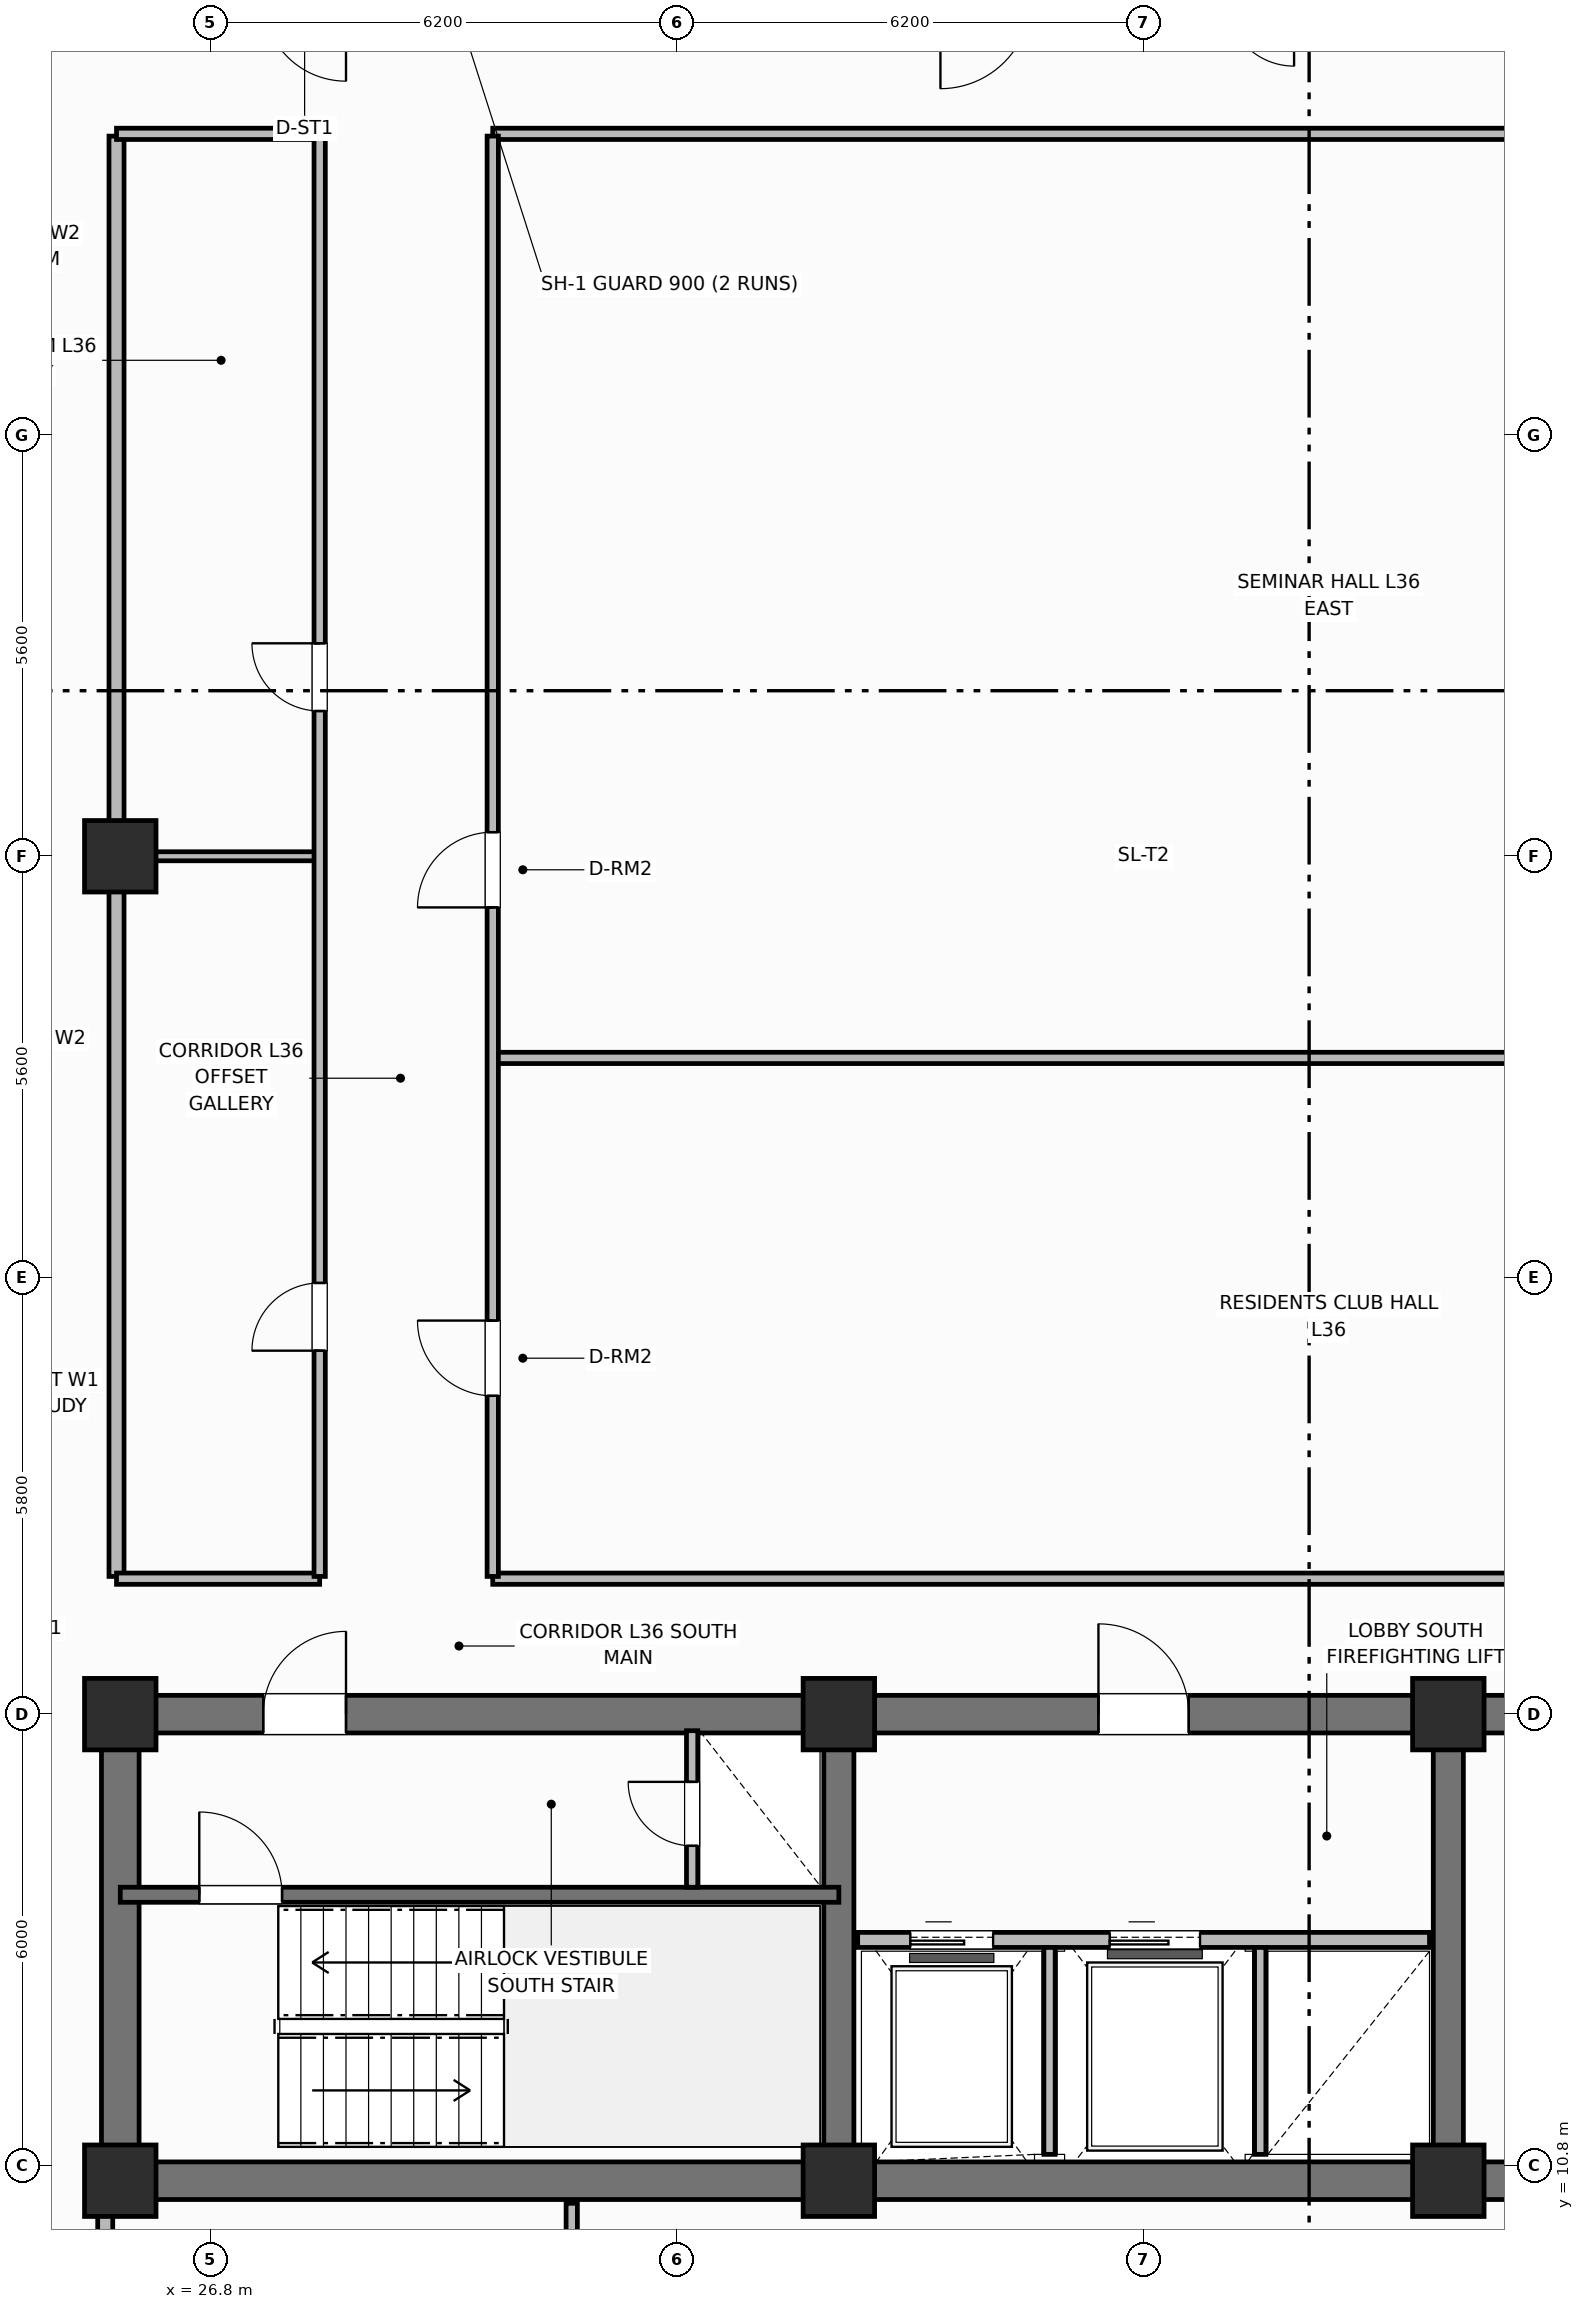
"""IFC4 building model, lengths in metres.
Left out: names, types, materials, properties, quantities, classifications, styles, units other than length and angle.
Written with IfcOpenShell. Run it as: python <this file> out.ifc"""

import sys

from ifc_helpers import new_model, si_unit, direction, frame, frame_2d, origin, origin_2d, place, context, subcontext, project, spatial, rectangle, extrude, element, fill, save


model = new_model("IFC4")
c1 = context("Model", 3, precision=1e-05, world=origin(), true_north=direction((0.0, 1.0)))
c2 = subcontext(c1, "Body", "Model", "MODEL_VIEW")
j1 = project(units=[si_unit("LENGTHUNIT", "METRE"), si_unit("PLANEANGLEUNIT", "RADIAN")], contexts=[c1])
p1 = place(None, origin())
s1 = spatial("IfcSite", under=j1, at=p1, CompositionType="ELEMENT")
p2 = place(p1, origin())
s2 = spatial("IfcBuilding", under=s1, at=p2, CompositionType="ELEMENT")
p3 = place(p2, frame((0.0, 0.0, 147.8)))
s3 = spatial("IfcBuildingStorey", under=s2, at=p3, CompositionType="ELEMENT", Elevation=147.8)
p4 = place(p3, frame((52.8, 10.6, 0.0), z_axis=(0.0, 0.0, 1.0), x_axis=(-1.0, 0.0, 0.0)))
e1 = element("IfcWall", 1, at=p4, inside=s3, PredefinedType="SHEAR", context=c2, shape_type="SweptSolid", body=[
    extrude(rectangle(XDim=27.2, YDim=0.5, at=frame_2d((13.6, 0.0))), origin(), (0.0, 0.0, 1.0), 3.7),
])
p5 = place(p3, frame((25.6, 10.85, 0.0), z_axis=(0.0, 0.0, 1.0), x_axis=(0.0, 1.0, 0.0)))
e2 = element("IfcWall", 2, at=p5, inside=s3, PredefinedType="SHEAR", context=c2, shape_type="SweptSolid", body=[
    extrude(rectangle(XDim=5.7, YDim=0.5, at=frame_2d((2.85, 0.0))), origin(), (0.0, 0.0, 1.0), 3.7),
])
p6 = place(p3, frame((25.6, 16.8, 0.0), z_axis=(0.0, 0.0, 1.0), x_axis=(1.0, 0.0, 0.0)))
e3 = element("IfcWall", 3, at=p6, inside=s3, PredefinedType="SHEAR", context=c2, shape_type="SweptSolid", body=[
    extrude(rectangle(XDim=27.2, YDim=0.5, at=frame_2d((13.6, 0.0))), origin(), (0.0, 0.0, 1.0), 3.7),
])
p7 = place(p6, frame((1.9, 0.0, 0.0)))
e4 = element("IfcOpeningElement", 4, at=p7, cuts=e3, PredefinedType="OPENING", context=c2, shape_type="SweptSolid", body=[
    extrude(rectangle(XDim=1.1, YDim=2.15, at=frame_2d((0.55, 1.075))), frame((0.0, 0.26, 0.0), z_axis=(0.0, -1.0, 0.0), x_axis=(1.0, 0.0, 0.0)), (0.0, 0.0, 1.0), 0.52),
])
p8 = place(p6, frame((13.0, 0.0, 0.0)))
e5 = element("IfcOpeningElement", 5, at=p8, cuts=e3, PredefinedType="OPENING", context=c2, shape_type="SweptSolid", body=[
    extrude(rectangle(XDim=1.2, YDim=2.15, at=frame_2d((0.6, 1.075))), frame((0.0, 0.26, 0.0), z_axis=(0.0, -1.0, 0.0), x_axis=(1.0, 0.0, 0.0)), (0.0, 0.0, 1.0), 0.52),
])
p9 = place(p6, frame((21.6, 0.0, 0.0)))
e6 = element("IfcOpeningElement", 6, at=p9, cuts=e3, PredefinedType="OPENING", context=c2, shape_type="SweptSolid", body=[
    extrude(rectangle(XDim=1.0, YDim=2.15, at=frame_2d((0.5, 1.075))), frame((0.0, 0.26, 0.0), z_axis=(0.0, -1.0, 0.0), x_axis=(1.0, 0.0, 0.0)), (0.0, 0.0, 1.0), 0.52),
])
for number, where, z_axis, x_axis in (
    (7, (35.15, 10.85, 0.0), (0.0, 0.0, 1.0), (0.0, 1.0, 0.0)),
    (8, (43.25, 10.85, 0.0), (0.0, 0.0, 1.0), (0.0, 1.0, 0.0)),
):
    element("IfcWall", number, at=place(p3, frame(where, z_axis=z_axis, x_axis=x_axis)), inside=s3, PredefinedType="SHEAR", context=c2, shape_type="SweptSolid", body=[
        extrude(rectangle(XDim=5.7, YDim=0.4, at=frame_2d((2.85, 0.0))), origin(), (0.0, 0.0, 1.0), 3.7),
    ])
for number, where, z_axis, x_axis in (
    (9, (25.6, 10.6, 0.0), (0.0, 0.0, 1.0), (1.0, 0.0, 0.0)),
    (10, (25.6, 16.8, 0.0), (0.0, 0.0, 1.0), (1.0, 0.0, 0.0)),
    (11, (35.15, 10.6, 0.0), (0.0, 0.0, 1.0), (1.0, 0.0, 0.0)),
    (12, (35.15, 16.8, 0.0), (0.0, 0.0, 1.0), (1.0, 0.0, 0.0)),
    (13, (43.25, 10.6, 0.0), (0.0, 0.0, 1.0), (1.0, 0.0, 0.0)),
    (14, (43.25, 16.8, 0.0), (0.0, 0.0, 1.0), (1.0, 0.0, 0.0)),
    (15, (25.6, 28.2, 0.0), (0.0, 0.0, 1.0), (1.0, 0.0, 0.0)),
):
    element("IfcColumn", number, at=place(p3, frame(where, z_axis=z_axis, x_axis=x_axis)), inside=s3, PredefinedType="COLUMN", context=c2, shape_type="SweptSolid", body=[
        extrude(rectangle(XDim=0.95, YDim=0.95, at=origin_2d()), origin(), (0.0, 0.0, 1.0), 3.7),
    ])
p10 = place(p3, frame((25.6, 14.4, 0.0), z_axis=(0.0, 0.0, 1.0), x_axis=(1.0, 0.0, 0.0)))
e16 = element("IfcWall", 16, at=p10, inside=s3, PredefinedType="SHEAR", context=c2, shape_type="SweptSolid", body=[
    extrude(rectangle(XDim=9.55, YDim=0.2, at=frame_2d((4.775, 0.0))), origin(), (0.0, 0.0, 1.0), 3.7),
])
p11 = place(p10, frame((1.05, 0.0, 0.0)))
e17 = element("IfcOpeningElement", 17, at=p11, cuts=e16, PredefinedType="OPENING", context=c2, shape_type="SweptSolid", body=[
    extrude(rectangle(XDim=1.1, YDim=2.15, at=frame_2d((0.55, 1.075))), frame((0.0, 0.11, 0.0), z_axis=(0.0, -1.0, 0.0), x_axis=(1.0, 0.0, 0.0)), (0.0, 0.0, 1.0), 0.22),
])
p12 = place(p3, frame((33.2, 14.5, 0.0), z_axis=(0.0, 0.0, 1.0), x_axis=(0.0, 1.0, 0.0)))
e18 = element("IfcWall", 18, at=p12, inside=s3, PredefinedType="PARTITIONING", context=c2, shape_type="SweptSolid", body=[
    extrude(rectangle(XDim=2.08, YDim=0.15, at=frame_2d((1.04, 0.0))), origin(), (0.0, 0.0, 1.0), 2.55),
])
p13 = place(p12, frame((0.55, 0.0, 0.0)))
e19 = element("IfcOpeningElement", 19, at=p13, cuts=e18, PredefinedType="OPENING", context=c2, shape_type="SweptSolid", body=[
    extrude(rectangle(XDim=0.85, YDim=2.05, at=frame_2d((0.425, 1.025))), frame((0.0, 0.085, 0.0), z_axis=(0.0, -1.0, 0.0), x_axis=(1.0, 0.0, 0.0)), (0.0, 0.0, 1.0), 0.17),
])
p14 = place(p3, frame((35.4, 13.8, 0.0), z_axis=(0.0, 0.0, 1.0), x_axis=(1.0, 0.0, 0.0)))
e20 = element("IfcWall", 20, at=p14, inside=s3, PredefinedType="PARTITIONING", context=c2, shape_type="SweptSolid", body=[
    extrude(rectangle(XDim=7.6, YDim=0.2, at=frame_2d((3.8, 0.0))), origin(), (0.0, 0.0, 1.0), 2.32),
])
p15 = place(p14, frame((0.7, 0.0, 0.0)))
e21 = element("IfcOpeningElement", 21, at=p15, cuts=e20, PredefinedType="OPENING", context=c2, shape_type="SweptSolid", body=[
    extrude(rectangle(XDim=1.1, YDim=2.15, at=frame_2d((0.55, 1.075))), frame((0.0, 0.11, 0.0), z_axis=(0.0, -1.0, 0.0), x_axis=(1.0, 0.0, 0.0)), (0.0, 0.0, 1.0), 0.22),
])
p16 = place(p14, frame((3.35, 0.0, 0.0)))
e22 = element("IfcOpeningElement", 22, at=p16, cuts=e20, PredefinedType="OPENING", context=c2, shape_type="SweptSolid", body=[
    extrude(rectangle(XDim=1.2, YDim=2.15, at=frame_2d((0.6, 1.075))), frame((0.0, 0.11, 0.0), z_axis=(0.0, -1.0, 0.0), x_axis=(1.0, 0.0, 0.0)), (0.0, 0.0, 1.0), 0.22),
])
for number, where, z_axis, x_axis in (
    (23, (37.95, 10.95, 0.0), (0.0, 0.0, 1.0), (0.0, 1.0, 0.0)),
    (24, (40.75, 10.95, 0.0), (0.0, 0.0, 1.0), (0.0, 1.0, 0.0)),
):
    element("IfcWall", number, at=place(p3, frame(where, z_axis=z_axis, x_axis=x_axis)), inside=s3, PredefinedType="PARTITIONING", context=c2, shape_type="SweptSolid", body=[
        extrude(rectangle(XDim=2.75, YDim=0.15, at=frame_2d((1.375, 0.0))), origin(), (0.0, 0.0, 1.0), 2.55),
    ])
p17 = place(p3, frame((25.55, 18.63, 0.0), z_axis=(0.0, 0.0, 1.0), x_axis=(0.0, 1.0, 0.0)))
e25 = element("IfcWall", 25, at=p17, inside=s3, PredefinedType="PARTITIONING", context=c2, shape_type="SweptSolid", body=[
    extrude(rectangle(XDim=19.14, YDim=0.2, at=frame_2d((9.57, 0.0))), origin(), (0.0, 0.0, 1.0), 2.55),
])
p18 = place(p3, frame((25.55, 18.6, 0.0), z_axis=(0.0, 0.0, 1.0), x_axis=(1.0, 0.0, 0.0)))
e26 = element("IfcWall", 26, at=p18, inside=s3, PredefinedType="PARTITIONING", context=c2, shape_type="SweptSolid", body=[
    extrude(rectangle(XDim=2.7, YDim=0.15, at=frame_2d((1.35, 0.0))), origin(), (0.0, 0.0, 1.0), 2.55),
])
p19 = place(p3, frame((30.55, 18.6, 0.0), z_axis=(0.0, 0.0, 1.0), x_axis=(1.0, 0.0, 0.0)))
e27 = element("IfcWall", 27, at=p19, inside=s3, PredefinedType="PARTITIONING", context=c2, shape_type="SweptSolid", body=[
    extrude(rectangle(XDim=22.3, YDim=0.15, at=frame_2d((11.15, 0.0))), origin(), (0.0, 0.0, 1.0), 2.55),
])
p20 = place(p3, frame((25.55, 37.8, 0.0), z_axis=(0.0, 0.0, 1.0), x_axis=(1.0, 0.0, 0.0)))
e28 = element("IfcWall", 28, at=p20, inside=s3, PredefinedType="PARTITIONING", context=c2, shape_type="SweptSolid", body=[
    extrude(rectangle(XDim=2.7, YDim=0.15, at=frame_2d((1.35, 0.0))), origin(), (0.0, 0.0, 1.0), 2.55),
])
p21 = place(p3, frame((30.55, 37.8, 0.0), z_axis=(0.0, 0.0, 1.0), x_axis=(1.0, 0.0, 0.0)))
e29 = element("IfcWall", 29, at=p21, inside=s3, PredefinedType="PARTITIONING", context=c2, shape_type="SweptSolid", body=[
    extrude(rectangle(XDim=22.3, YDim=0.15, at=frame_2d((11.15, 0.0))), origin(), (0.0, 0.0, 1.0), 2.55),
])
p22 = place(p3, frame((25.6, 28.2, 0.0), z_axis=(0.0, 0.0, 1.0), x_axis=(1.0, 0.0, 0.0)))
e30 = element("IfcWall", 30, at=p22, inside=s3, PredefinedType="PARTITIONING", context=c2, shape_type="SweptSolid", body=[
    extrude(rectangle(XDim=2.66, YDim=0.12, at=frame_2d((1.33, 0.0))), origin(), (0.0, 0.0, 1.0), 2.55),
])
p23 = place(p3, frame((30.58, 25.521, 0.0), z_axis=(0.0, 0.0, 1.0), x_axis=(1.0, 0.0, 0.0)))
e31 = element("IfcWall", 31, at=p23, inside=s3, PredefinedType="PARTITIONING", context=c2, shape_type="SweptSolid", body=[
    extrude(rectangle(XDim=22.22, YDim=0.15, at=frame_2d((11.11, 0.0))), origin(), (0.0, 0.0, 1.0), 2.55),
])
p24 = place(p3, frame((28.25, 18.63, 0.0), z_axis=(0.0, 0.0, 1.0), x_axis=(0.0, 1.0, 0.0)))
e32 = element("IfcWall", 32, at=p24, inside=s3, PredefinedType="PARTITIONING", context=c2, shape_type="SweptSolid", body=[
    extrude(rectangle(XDim=19.14, YDim=0.15, at=frame_2d((9.57, 0.0))), origin(), (0.0, 0.0, 1.0), 2.55),
])
p25 = place(p24, frame((3.0, 0.0, 0.0)))
e33 = element("IfcOpeningElement", 33, at=p25, cuts=e32, PredefinedType="OPENING", context=c2, shape_type="SweptSolid", body=[
    extrude(rectangle(XDim=0.9, YDim=2.1, at=frame_2d((0.45, 1.05))), frame((0.0, 0.085, 0.0), z_axis=(0.0, -1.0, 0.0), x_axis=(1.0, 0.0, 0.0)), (0.0, 0.0, 1.0), 0.17),
])
p26 = place(p24, frame((11.5, 0.0, 0.0)))
e34 = element("IfcOpeningElement", 34, at=p26, cuts=e32, PredefinedType="OPENING", context=c2, shape_type="SweptSolid", body=[
    extrude(rectangle(XDim=0.9, YDim=2.1, at=frame_2d((0.45, 1.05))), frame((0.0, 0.085, 0.0), z_axis=(0.0, -1.0, 0.0), x_axis=(1.0, 0.0, 0.0)), (0.0, 0.0, 1.0), 0.17),
])
p27 = place(p3, frame((30.55, 18.63, 0.0), z_axis=(0.0, 0.0, 1.0), x_axis=(0.0, 1.0, 0.0)))
e35 = element("IfcWall", 35, at=p27, inside=s3, PredefinedType="PARTITIONING", context=c2, shape_type="SweptSolid", body=[
    extrude(rectangle(XDim=19.14, YDim=0.15, at=frame_2d((9.57, 0.0))), origin(), (0.0, 0.0, 1.0), 2.55),
])
p28 = place(p27, frame((2.4, 0.0, 0.0)))
e36 = element("IfcOpeningElement", 36, at=p28, cuts=e35, PredefinedType="OPENING", context=c2, shape_type="SweptSolid", body=[
    extrude(rectangle(XDim=1.0, YDim=2.15, at=frame_2d((0.5, 1.075))), frame((0.0, 0.085, 0.0), z_axis=(0.0, -1.0, 0.0), x_axis=(1.0, 0.0, 0.0)), (0.0, 0.0, 1.0), 0.17),
])
p29 = place(p27, frame((8.89, 0.0, 0.0)))
e37 = element("IfcOpeningElement", 37, at=p29, cuts=e35, PredefinedType="OPENING", context=c2, shape_type="SweptSolid", body=[
    extrude(rectangle(XDim=1.0, YDim=2.15, at=frame_2d((0.5, 1.075))), frame((0.0, 0.085, 0.0), z_axis=(0.0, -1.0, 0.0), x_axis=(1.0, 0.0, 0.0)), (0.0, 0.0, 1.0), 0.17),
])
p30 = place(p3, frame((31.6, 6.87, 0.0), z_axis=(0.0, 0.0, 1.0), x_axis=(0.0, 1.0, 0.0)))
e38 = element("IfcWall", 38, at=p30, inside=s3, PredefinedType="PARTITIONING", context=c2, shape_type="SweptSolid", body=[
    extrude(rectangle(XDim=3.43, YDim=0.15, at=frame_2d((1.715, 0.0))), origin(), (0.0, 0.0, 1.0), 2.55),
])
p31 = place(p30, frame((1.25, 0.0, 0.0)))
e39 = element("IfcOpeningElement", 39, at=p31, cuts=e38, PredefinedType="OPENING", context=c2, shape_type="SweptSolid", body=[
    extrude(rectangle(XDim=0.9, YDim=2.1, at=frame_2d((0.45, 1.05))), frame((0.0, 0.085, 0.0), z_axis=(0.0, -1.0, 0.0), x_axis=(1.0, 0.0, 0.0)), (0.0, 0.0, 1.0), 0.17),
])
p32 = place(p3, frame((25.4, 7.47, 0.0), z_axis=(0.0, 0.0, 1.0), x_axis=(0.0, 1.0, 0.0)))
e40 = element("IfcWall", 40, at=p32, inside=s3, PredefinedType="PARTITIONING", context=c2, shape_type="SweptSolid", body=[
    extrude(rectangle(XDim=2.83, YDim=0.2, at=frame_2d((1.415, 0.0))), origin(), (0.0, 0.0, 1.0), 2.55),
])
p33 = place(p32, frame((0.65, 0.0, 0.0)))
e41 = element("IfcOpeningElement", 41, at=p33, cuts=e40, PredefinedType="OPENING", context=c2, shape_type="SweptSolid", body=[
    extrude(rectangle(XDim=0.9, YDim=2.1, at=frame_2d((0.45, 1.05))), frame((0.0, 0.11, 0.0), z_axis=(0.0, -1.0, 0.0), x_axis=(1.0, 0.0, 0.0)), (0.0, 0.0, 1.0), 0.22),
])
p34 = place(p11, origin())
e42 = element("IfcDoor", 42, at=p34, inside=s3, OperationType="SINGLE_SWING_LEFT", PredefinedType="DOOR", context=c2, shape_type="SweptSolid", body=[
    extrude(rectangle(XDim=1.1, YDim=2.15, at=frame_2d((0.55, 1.075))), frame((0.0, 0.025, 0.0), z_axis=(0.0, -1.0, 0.0), x_axis=(1.0, 0.0, 0.0)), (0.0, 0.0, 1.0), 0.05),
])
fill(e17, e42)
p35 = place(p13, origin())
e43 = element("IfcDoor", 43, at=p35, inside=s3, OperationType="SINGLE_SWING_RIGHT", PredefinedType="TRAPDOOR", context=c2, shape_type="SweptSolid", body=[
    extrude(rectangle(XDim=0.85, YDim=2.05, at=frame_2d((0.425, 1.025))), frame((0.0, 0.025, 0.0), z_axis=(0.0, -1.0, 0.0), x_axis=(1.0, 0.0, 0.0)), (0.0, 0.0, 1.0), 0.05),
])
fill(e19, e43)
p36 = place(p15, origin())
e44 = element("IfcDoor", 44, at=p36, inside=s3, OperationType="SLIDING_TO_LEFT", PredefinedType="DOOR", context=c2, shape_type="SweptSolid", body=[
    extrude(rectangle(XDim=1.1, YDim=2.15, at=frame_2d((0.55, 1.075))), frame((0.0, 0.025, 0.0), z_axis=(0.0, -1.0, 0.0), x_axis=(1.0, 0.0, 0.0)), (0.0, 0.0, 1.0), 0.05),
])
fill(e21, e44)
p37 = place(p16, origin())
e45 = element("IfcDoor", 45, at=p37, inside=s3, OperationType="SLIDING_TO_LEFT", PredefinedType="DOOR", context=c2, shape_type="SweptSolid", body=[
    extrude(rectangle(XDim=1.2, YDim=2.15, at=frame_2d((0.6, 1.075))), frame((0.0, 0.025, 0.0), z_axis=(0.0, -1.0, 0.0), x_axis=(1.0, 0.0, 0.0)), (0.0, 0.0, 1.0), 0.05),
])
fill(e22, e45)
p38 = place(p25, origin())
e46 = element("IfcDoor", 46, at=p38, inside=s3, OperationType="SINGLE_SWING_LEFT", PredefinedType="DOOR", context=c2, shape_type="SweptSolid", body=[
    extrude(rectangle(XDim=0.9, YDim=2.1, at=frame_2d((0.45, 1.05))), frame((0.0, 0.025, 0.0), z_axis=(0.0, -1.0, 0.0), x_axis=(1.0, 0.0, 0.0)), (0.0, 0.0, 1.0), 0.05),
])
fill(e33, e46)
p39 = place(p26, origin())
e47 = element("IfcDoor", 47, at=p39, inside=s3, OperationType="SINGLE_SWING_RIGHT", PredefinedType="DOOR", context=c2, shape_type="SweptSolid", body=[
    extrude(rectangle(XDim=0.9, YDim=2.1, at=frame_2d((0.45, 1.05))), frame((0.0, 0.025, 0.0), z_axis=(0.0, -1.0, 0.0), x_axis=(1.0, 0.0, 0.0)), (0.0, 0.0, 1.0), 0.05),
])
fill(e34, e47)
p40 = place(p28, origin())
e48 = element("IfcDoor", 48, at=p40, inside=s3, OperationType="SINGLE_SWING_RIGHT", PredefinedType="DOOR", context=c2, shape_type="SweptSolid", body=[
    extrude(rectangle(XDim=1.0, YDim=2.15, at=frame_2d((0.5, 1.075))), frame((0.0, 0.025, 0.0), z_axis=(0.0, -1.0, 0.0), x_axis=(1.0, 0.0, 0.0)), (0.0, 0.0, 1.0), 0.05),
])
fill(e36, e48)
p41 = place(p29, origin())
e49 = element("IfcDoor", 49, at=p41, inside=s3, OperationType="SINGLE_SWING_LEFT", PredefinedType="DOOR", context=c2, shape_type="SweptSolid", body=[
    extrude(rectangle(XDim=1.0, YDim=2.15, at=frame_2d((0.5, 1.075))), frame((0.0, 0.025, 0.0), z_axis=(0.0, -1.0, 0.0), x_axis=(1.0, 0.0, 0.0)), (0.0, 0.0, 1.0), 0.05),
])
fill(e37, e49)
p42 = place(p7, origin())
e50 = element("IfcDoor", 50, at=p42, inside=s3, OperationType="SINGLE_SWING_RIGHT", PredefinedType="DOOR", context=c2, shape_type="SweptSolid", body=[
    extrude(rectangle(XDim=1.1, YDim=2.15, at=frame_2d((0.55, 1.075))), frame((0.0, 0.025, 0.0), z_axis=(0.0, -1.0, 0.0), x_axis=(1.0, 0.0, 0.0)), (0.0, 0.0, 1.0), 0.05),
])
fill(e4, e50)
p43 = place(p8, origin())
e51 = element("IfcDoor", 51, at=p43, inside=s3, OperationType="SINGLE_SWING_LEFT", PredefinedType="DOOR", context=c2, shape_type="SweptSolid", body=[
    extrude(rectangle(XDim=1.2, YDim=2.15, at=frame_2d((0.6, 1.075))), frame((0.0, 0.025, 0.0), z_axis=(0.0, -1.0, 0.0), x_axis=(1.0, 0.0, 0.0)), (0.0, 0.0, 1.0), 0.05),
])
fill(e5, e51)
save(model, sys.argv[1])
